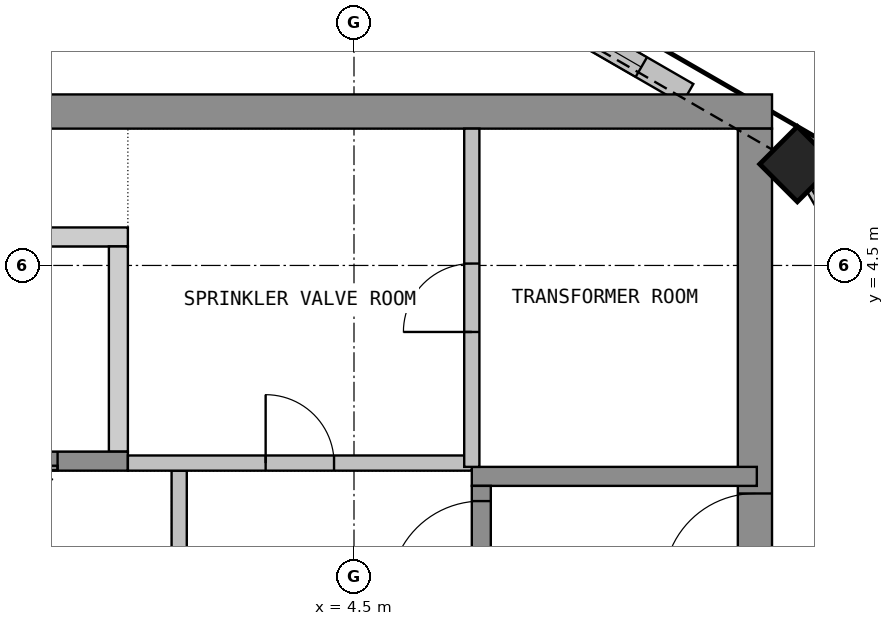
"""IFC4 building model, lengths in metres.
Left out: names, types, materials, properties, quantities, classifications, styles, units other than length and angle.
Written with IfcOpenShell. Run it as: python <this file> out.ifc"""

import sys

from ifc_helpers import new_model, si_unit, direction, frame, frame_2d, origin, origin_2d, place, context, subcontext, project, spatial, polyline, rectangle, outline, extrude, element, fill, save


model = new_model("IFC4")
c1 = context("Model", 3, precision=1e-05, world=origin(), true_north=direction((0.0, 1.0)))
c2 = subcontext(c1, "Body", "Model", "MODEL_VIEW")
j1 = project(units=[si_unit("LENGTHUNIT", "METRE"), si_unit("PLANEANGLEUNIT", "RADIAN")], contexts=[c1])
p1 = place(None, origin())
s1 = spatial("IfcSite", under=j1, at=p1, CompositionType="ELEMENT")
p2 = place(p1, origin())
s2 = spatial("IfcBuilding", under=s1, at=p2, CompositionType="ELEMENT")
p3 = place(p2, frame((0.0, 0.0, 336.9)))
s3 = spatial("IfcBuildingStorey", under=s2, at=p3, CompositionType="ELEMENT", Elevation=336.9)
p4 = place(p3, frame((10.333, 5.833, 0.0), z_axis=(0.0, 0.0, 1.0), x_axis=(-0.707106781187, 0.707106781187, 0.0)))
e1 = element("IfcColumn", 1, at=p4, inside=s3, PredefinedType="COLUMN", context=c2, shape_type="SweptSolid", body=[
    extrude(rectangle(XDim=0.7, YDim=0.7, at=origin_2d()), origin(), (0.0, 0.0, 1.0), 3.9),
])
p5 = place(p3, frame((12.346, 2.505, 0.0), z_axis=(0.0, 0.0, 1.0), x_axis=(-0.499987607361, 0.86603255856, 0.0)))
e2 = element("IfcWall", 2, at=p5, inside=s3, PredefinedType="SOLIDWALL", context=c2, shape_type="SweptSolid", body=[
    extrude(rectangle(XDim=3.507, YDim=0.3, at=frame_2d((1.753, 0.0))), origin(), (0.0, 0.0, 1.0), 3.0),
])
p6 = place(p5, frame((0.553, 0.0, 0.6)))
e3 = element("IfcOpeningElement", 3, at=p6, cuts=e2, PredefinedType="OPENING", context=c2, shape_type="SweptSolid", body=[
    extrude(rectangle(XDim=2.4, YDim=2.3, at=frame_2d((1.2, 1.15))), frame((0.0, 0.16, 0.0), z_axis=(0.0, -1.0, 0.0), x_axis=(1.0, 0.0, 0.0)), (0.0, 0.0, 1.0), 0.32),
])
p7 = place(p3, frame((8.89, 6.758, 0.0), z_axis=(0.0, 0.0, 1.0), x_axis=(-0.866060442015, 0.499939307093, 0.0)))
e4 = element("IfcWall", 4, at=p7, inside=s3, PredefinedType="SOLIDWALL", context=c2, shape_type="SweptSolid", body=[
    extrude(rectangle(XDim=2.177, YDim=0.3, at=frame_2d((1.088, 0.0))), origin(), (0.0, 0.0, 1.0), 3.0),
])
p8 = place(p7, frame((0.704, 0.0, 0.6)))
e5 = element("IfcOpeningElement", 5, at=p8, cuts=e4, PredefinedType="OPENING", context=c2, shape_type="SweptSolid", body=[
    extrude(rectangle(XDim=1.3, YDim=2.3, at=frame_2d((0.65, 1.15))), frame((0.0, 0.16, 0.0), z_axis=(0.0, -1.0, 0.0), x_axis=(1.0, 0.0, 0.0)), (0.0, 0.0, 1.0), 0.32),
])
p9 = place(p3, frame((-10.0, 6.525, 0.0), z_axis=(0.0, 0.0, 1.0), x_axis=(1.0, 0.0, 0.0)))
e6 = element("IfcWall", 6, at=p9, inside=s3, PredefinedType="SHEAR", context=c2, shape_type="SweptSolid", body=[
    extrude(rectangle(XDim=20.0, YDim=0.45, at=frame_2d((10.0, 0.0))), origin(), (0.0, 0.0, 1.0), 3.9),
])
p10 = place(p3, frame((9.775, -6.3, 0.0), z_axis=(0.0, 0.0, 1.0), x_axis=(0.0, 1.0, 0.0)))
e7 = element("IfcWall", 7, at=p10, inside=s3, PredefinedType="SHEAR", context=c2, shape_type="SweptSolid", body=[
    extrude(rectangle(XDim=12.6, YDim=0.45, at=frame_2d((6.3, 0.0))), origin(), (0.0, 0.0, 1.0), 3.9),
])
p11 = place(p10, frame((6.6, 0.0, 0.0)))
e8 = element("IfcOpeningElement", 8, at=p11, cuts=e7, PredefinedType="OPENING", context=c2, shape_type="SweptSolid", body=[
    extrude(rectangle(XDim=1.2, YDim=2.1, at=frame_2d((0.6, 1.05))), frame((0.0, 0.235, 0.0), z_axis=(0.0, -1.0, 0.0), x_axis=(1.0, 0.0, 0.0)), (0.0, 0.0, 1.0), 0.47),
])
p12 = place(p3, origin())
e9 = element("IfcWall", 9, at=p12, inside=s3, PredefinedType="SHEAR", context=c2, shape_type="SweptSolid", body=[
    extrude(outline(polyline([(-1.525, 4.75), (1.525, 4.75), (1.525, 5.0), (-1.525, 5.0), (-1.525, 4.75)])), origin(), (0.0, 0.0, 1.0), 3.9),
])
p13 = place(p3, origin())
e10 = element("IfcWall", 10, at=p13, inside=s3, PredefinedType="SHEAR", context=c2, shape_type="SweptSolid", body=[
    extrude(outline(polyline([(1.275, 2.05), (1.525, 2.05), (1.525, 4.75), (1.275, 4.75), (1.275, 2.05)])), origin(), (0.0, 0.0, 1.0), 3.9),
])
p14 = place(p3, frame((-1.525, 1.925, 0.0), z_axis=(0.0, 0.0, 1.0), x_axis=(1.0, 0.0, 0.0)))
e11 = element("IfcWall", 11, at=p14, inside=s3, PredefinedType="SHEAR", context=c2, shape_type="SweptSolid", body=[
    extrude(rectangle(XDim=3.05, YDim=0.25, at=frame_2d((1.525, 0.0))), origin(), (0.0, 0.0, 1.0), 3.9),
])
p15 = place(p14, frame((0.925, 0.0, 0.0)))
e12 = element("IfcOpeningElement", 12, at=p15, cuts=e11, PredefinedType="OPENING", context=c2, shape_type="SweptSolid", body=[
    extrude(rectangle(XDim=1.2, YDim=2.1, at=frame_2d((0.6, 1.05))), frame((0.0, 0.135, 0.0), z_axis=(0.0, -1.0, 0.0), x_axis=(1.0, 0.0, 0.0)), (0.0, 0.0, 1.0), 0.27),
])
p16 = place(p3, frame((2.2, -1.8, 0.0), z_axis=(0.0, 0.0, 1.0), x_axis=(0.0, 1.0, 0.0)))
e13 = element("IfcWall", 13, at=p16, inside=s3, PredefinedType="PARTITIONING", context=c2, shape_type="SweptSolid", body=[
    extrude(rectangle(XDim=3.6, YDim=0.2, at=frame_2d((1.8, 0.0))), origin(), (0.0, 0.0, 1.0), 3.9),
])
p17 = place(p16, frame((1.2, 0.0, 0.0)))
e14 = element("IfcOpeningElement", 14, at=p17, cuts=e13, PredefinedType="OPENING", context=c2, shape_type="SweptSolid", body=[
    extrude(rectangle(XDim=1.2, YDim=2.1, at=frame_2d((0.6, 1.05))), frame((0.0, 0.11, 0.0), z_axis=(0.0, -1.0, 0.0), x_axis=(1.0, 0.0, 0.0)), (0.0, 0.0, 1.0), 0.22),
])
p18 = place(p3, frame((6.05, 1.725, 0.0), z_axis=(0.0, 0.0, 1.0), x_axis=(1.0, 0.0, 0.0)))
e15 = element("IfcWall", 15, at=p18, inside=s3, PredefinedType="SHEAR", context=c2, shape_type="SweptSolid", body=[
    extrude(rectangle(XDim=3.75, YDim=0.25, at=frame_2d((1.875, 0.0))), origin(), (0.0, 0.0, 1.0), 3.9),
])
p19 = place(p3, frame((6.175, -5.0, 0.0), z_axis=(0.0, 0.0, 1.0), x_axis=(0.0, 1.0, 0.0)))
e16 = element("IfcWall", 16, at=p19, inside=s3, PredefinedType="SHEAR", context=c2, shape_type="SweptSolid", body=[
    extrude(rectangle(XDim=6.6, YDim=0.25, at=frame_2d((3.3, 0.0))), origin(), (0.0, 0.0, 1.0), 3.9),
])
p20 = place(p19, frame((5.2, 0.0, 0.0)))
e17 = element("IfcOpeningElement", 17, at=p20, cuts=e16, PredefinedType="OPENING", context=c2, shape_type="SweptSolid", body=[
    extrude(rectangle(XDim=1.2, YDim=2.1, at=frame_2d((0.6, 1.05))), frame((0.0, 0.135, 0.0), z_axis=(0.0, -1.0, 0.0), x_axis=(1.0, 0.0, 0.0)), (0.0, 0.0, 1.0), 0.27),
])
p21 = place(p3, frame((1.525, 1.9, 0.0), z_axis=(0.0, 0.0, 1.0), x_axis=(1.0, 0.0, 0.0)))
e18 = element("IfcWall", 18, at=p21, inside=s3, PredefinedType="PARTITIONING", context=c2, shape_type="SweptSolid", body=[
    extrude(rectangle(XDim=4.525, YDim=0.2, at=frame_2d((2.263, 0.0))), origin(), (0.0, 0.0, 1.0), 3.9),
])
p22 = place(p21, frame((1.812, 0.0, 0.0)))
e19 = element("IfcOpeningElement", 19, at=p22, cuts=e18, PredefinedType="OPENING", context=c2, shape_type="SweptSolid", body=[
    extrude(rectangle(XDim=0.9, YDim=2.1, at=frame_2d((0.45, 1.05))), frame((0.0, 0.11, 0.0), z_axis=(0.0, -1.0, 0.0), x_axis=(1.0, 0.0, 0.0)), (0.0, 0.0, 1.0), 0.22),
])
p23 = place(p3, frame((6.05, 1.85, 0.0), z_axis=(0.0, 0.0, 1.0), x_axis=(0.0, 1.0, 0.0)))
e20 = element("IfcWall", 20, at=p23, inside=s3, PredefinedType="PARTITIONING", context=c2, shape_type="SweptSolid", body=[
    extrude(rectangle(XDim=4.45, YDim=0.2, at=frame_2d((2.225, 0.0))), origin(), (0.0, 0.0, 1.0), 3.9),
])
p24 = place(p23, frame((1.775, 0.0, 0.0)))
e21 = element("IfcOpeningElement", 21, at=p24, cuts=e20, PredefinedType="OPENING", context=c2, shape_type="SweptSolid", body=[
    extrude(rectangle(XDim=0.9, YDim=2.1, at=frame_2d((0.45, 1.05))), frame((0.0, 0.11, 0.0), z_axis=(0.0, -1.0, 0.0), x_axis=(1.0, 0.0, 0.0)), (0.0, 0.0, 1.0), 0.22),
])
p25 = place(p8, origin())
e22 = element("IfcWindow", 22, at=p25, inside=s3, PartitioningType="SINGLE_PANEL", PredefinedType="WINDOW", context=c2, shape_type="SweptSolid", body=[
    extrude(rectangle(XDim=1.3, YDim=2.3, at=frame_2d((0.65, 1.15))), frame((0.0, 0.03, 0.0), z_axis=(0.0, -1.0, 0.0), x_axis=(1.0, 0.0, 0.0)), (0.0, 0.0, 1.0), 0.06),
])
fill(e5, e22)
p26 = place(p11, origin())
e23 = element("IfcDoor", 23, at=p26, inside=s3, OperationType="SINGLE_SWING_RIGHT", PredefinedType="DOOR", context=c2, shape_type="SweptSolid", body=[
    extrude(rectangle(XDim=1.2, YDim=2.1, at=frame_2d((0.6, 1.05))), frame((0.0, 0.025, 0.0), z_axis=(0.0, -1.0, 0.0), x_axis=(1.0, 0.0, 0.0)), (0.0, 0.0, 1.0), 0.05),
])
fill(e8, e23)
p27 = place(p15, origin())
e24 = element("IfcDoor", 24, at=p27, inside=s3, OperationType="DOUBLE_DOOR_SLIDING", PredefinedType="DOOR", context=c2, shape_type="SweptSolid", body=[
    extrude(rectangle(XDim=1.2, YDim=2.1, at=frame_2d((0.6, 1.05))), frame((0.0, 0.025, 0.0), z_axis=(0.0, -1.0, 0.0), x_axis=(1.0, 0.0, 0.0)), (0.0, 0.0, 1.0), 0.05),
])
fill(e12, e24)
p28 = place(p20, origin())
e25 = element("IfcDoor", 25, at=p28, inside=s3, OperationType="SINGLE_SWING_LEFT", PredefinedType="DOOR", context=c2, shape_type="SweptSolid", body=[
    extrude(rectangle(XDim=1.2, YDim=2.1, at=frame_2d((0.6, 1.05))), frame((0.0, 0.025, 0.0), z_axis=(0.0, -1.0, 0.0), x_axis=(1.0, 0.0, 0.0)), (0.0, 0.0, 1.0), 0.05),
])
fill(e17, e25)
p29 = place(p22, origin())
e26 = element("IfcDoor", 26, at=p29, inside=s3, OperationType="SINGLE_SWING_LEFT", PredefinedType="DOOR", context=c2, shape_type="SweptSolid", body=[
    extrude(rectangle(XDim=0.9, YDim=2.1, at=frame_2d((0.45, 1.05))), frame((0.0, 0.025, 0.0), z_axis=(0.0, -1.0, 0.0), x_axis=(1.0, 0.0, 0.0)), (0.0, 0.0, 1.0), 0.05),
])
fill(e19, e26)
p30 = place(p24, origin())
e27 = element("IfcDoor", 27, at=p30, inside=s3, OperationType="SINGLE_SWING_LEFT", PredefinedType="DOOR", context=c2, shape_type="SweptSolid", body=[
    extrude(rectangle(XDim=0.9, YDim=2.1, at=frame_2d((0.45, 1.05))), frame((0.0, 0.025, 0.0), z_axis=(0.0, -1.0, 0.0), x_axis=(1.0, 0.0, 0.0)), (0.0, 0.0, 1.0), 0.05),
])
fill(e21, e27)
save(model, sys.argv[1])
